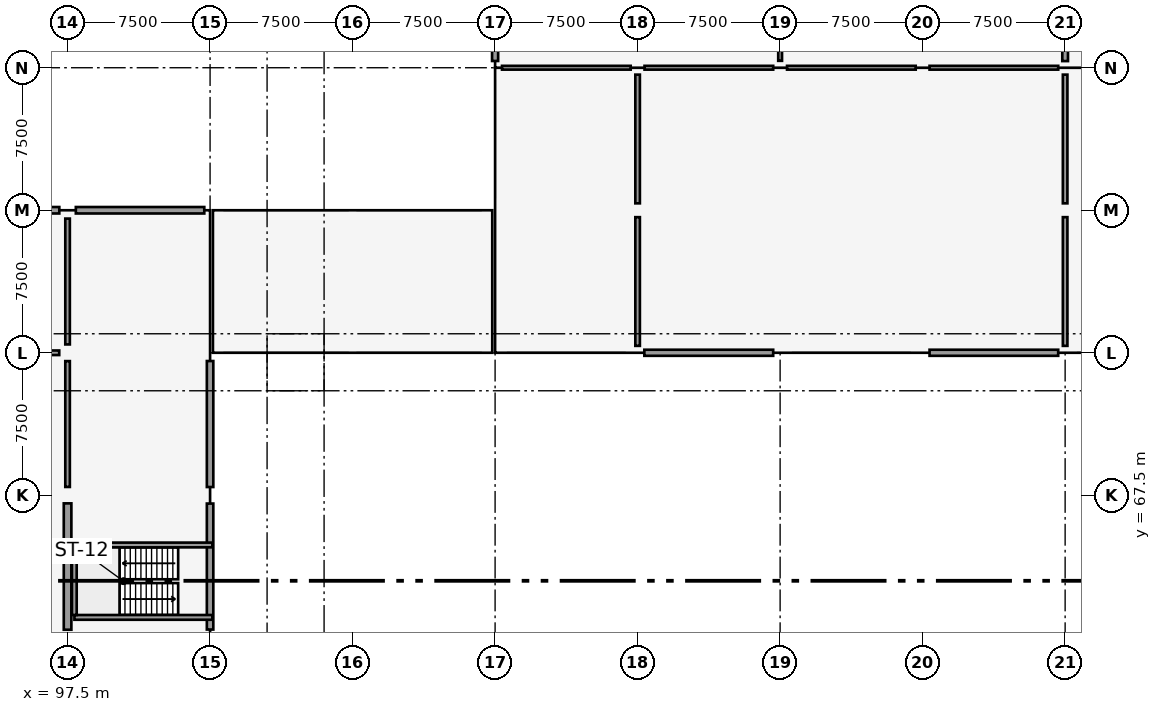
"""IFC4 building model, lengths in metres.
Left out: names, types, materials, properties, quantities, classifications, styles, units other than length and angle.
Written with IfcOpenShell. Run it as: python <this file> out.ifc"""

import sys

from ifc_helpers import new_model, si_unit, direction, frame, frame_2d, origin, origin_2d, place, context, subcontext, project, spatial, rectangle, extrude, element, fill, save


model = new_model("IFC4")
c1 = context("Model", 3, precision=1e-05, world=origin(), true_north=direction((0.0, 1.0)))
c2 = subcontext(c1, "Body", "Model", "MODEL_VIEW")
j1 = project(units=[si_unit("LENGTHUNIT", "METRE"), si_unit("PLANEANGLEUNIT", "RADIAN")], contexts=[c1])
p1 = place(None, origin())
s1 = spatial("IfcSite", under=j1, at=p1, CompositionType="ELEMENT")
p2 = place(p1, origin())
s2 = spatial("IfcBuilding", under=s1, at=p2, CompositionType="ELEMENT")
p3 = place(p2, frame((0.0, 0.0, 4.8)))
s3 = spatial("IfcBuildingStorey", under=s2, at=p3, CompositionType="ELEMENT", Elevation=4.8)
for number, where, z_axis, x_axis in (
    (1, (97.5, 60.0, 0.0), (0.0, 0.0, 1.0), (1.0, 0.0, 0.0)),
    (2, (97.5, 67.5, 0.0), (0.0, 0.0, 1.0), (1.0, 0.0, 0.0)),
    (3, (97.5, 75.0, 0.0), (0.0, 0.0, 1.0), (1.0, 0.0, 0.0)),
    (4, (97.5, 82.5, 0.0), (0.0, 0.0, 1.0), (1.0, 0.0, 0.0)),
    (5, (105.0, 60.0, 0.0), (0.0, 0.0, 1.0), (1.0, 0.0, 0.0)),
    (6, (105.0, 67.5, 0.0), (0.0, 0.0, 1.0), (1.0, 0.0, 0.0)),
    (7, (105.0, 75.0, 0.0), (0.0, 0.0, 1.0), (1.0, 0.0, 0.0)),
):
    element("IfcColumn", number, at=place(p3, frame(where, z_axis=z_axis, x_axis=x_axis)), inside=s3, PredefinedType="COLUMN", context=c2, shape_type="SweptSolid", body=[
        extrude(rectangle(XDim=0.85, YDim=0.85, at=origin_2d()), origin(), (0.0, 0.0, 1.0), 4.2),
    ])
p4 = place(p3, frame((105.0, 82.5, 0.0), z_axis=(0.0, 0.0, 1.0), x_axis=(1.0, 0.0, 0.0)))
e8 = element("IfcColumn", 8, at=p4, inside=s3, PredefinedType="COLUMN", context=c2, shape_type="SweptSolid", body=[
    extrude(rectangle(XDim=0.6, YDim=1.1, at=origin_2d()), origin(), (0.0, 0.0, 1.0), 4.2),
])
for number, where, z_axis, x_axis in (
    (9, (120.0, 75.0, 0.0), (0.0, 0.0, 1.0), (1.0, 0.0, 0.0)),
    (10, (120.0, 82.5, 0.0), (0.0, 0.0, 1.0), (1.0, 0.0, 0.0)),
    (11, (120.0, 90.0, 0.0), (0.0, 0.0, 1.0), (1.0, 0.0, 0.0)),
    (12, (127.5, 75.0, 0.0), (0.0, 0.0, 1.0), (1.0, 0.0, 0.0)),
    (13, (127.5, 82.5, 0.0), (0.0, 0.0, 1.0), (1.0, 0.0, 0.0)),
    (14, (127.5, 90.0, 0.0), (0.0, 0.0, 1.0), (1.0, 0.0, 0.0)),
    (15, (135.0, 75.0, 0.0), (0.0, 0.0, 1.0), (1.0, 0.0, 0.0)),
    (16, (135.0, 90.0, 0.0), (0.0, 0.0, 1.0), (1.0, 0.0, 0.0)),
    (17, (142.5, 75.0, 0.0), (0.0, 0.0, 1.0), (1.0, 0.0, 0.0)),
    (18, (142.5, 90.0, 0.0), (0.0, 0.0, 1.0), (1.0, 0.0, 0.0)),
    (19, (150.0, 75.0, 0.0), (0.0, 0.0, 1.0), (1.0, 0.0, 0.0)),
    (20, (150.0, 82.5, 0.0), (0.0, 0.0, 1.0), (1.0, 0.0, 0.0)),
    (21, (150.0, 90.0, 0.0), (0.0, 0.0, 1.0), (1.0, 0.0, 0.0)),
):
    element("IfcColumn", number, at=place(p3, frame(where, z_axis=z_axis, x_axis=x_axis)), inside=s3, PredefinedType="COLUMN", context=c2, shape_type="SweptSolid", body=[
        extrude(rectangle(XDim=0.7, YDim=0.7, at=origin_2d()), origin(), (0.0, 0.0, 1.0), 4.2),
    ])
p5 = place(p3, frame((105.0, 71.25, 0.0), z_axis=(0.0, 0.0, 1.0), x_axis=(1.0, 0.0, 0.0)))
e22 = element("IfcColumn", 22, at=p5, inside=s3, PredefinedType="PILASTER", context=c2, shape_type="SweptSolid", body=[
    extrude(rectangle(XDim=0.45, YDim=0.85, at=origin_2d()), origin(), (0.0, 0.0, 1.0), 4.2),
])
p6 = place(p3, frame((97.5, 60.425, 0.0), z_axis=(0.0, 0.0, 1.0), x_axis=(0.0, 1.0, 0.0)))
e23 = element("IfcWall", 23, at=p6, inside=s3, PredefinedType="SHEAR", context=c2, shape_type="SweptSolid", body=[
    extrude(rectangle(XDim=6.65, YDim=0.4, at=frame_2d((3.325, 0.0))), origin(), (0.0, 0.0, 1.0), 2.87),
])
p7 = place(p3, frame((150.0, 90.35, 0.0), z_axis=(0.0, 0.0, 1.0), x_axis=(0.0, 1.0, 0.0)))
e24 = element("IfcWall", 24, at=p7, inside=s3, PredefinedType="SHEAR", context=c2, shape_type="SweptSolid", body=[
    extrude(rectangle(XDim=6.8, YDim=0.3, at=frame_2d((3.4, 0.0))), origin(), (0.0, 0.0, 1.0), 3.9),
])
for number, where, z_axis, x_axis in (
    (25, (105.0, 60.435, 0.0), (0.0, 0.0, 1.0), (0.0, 1.0, 0.0)),
    (26, (105.0, 67.935, 0.0), (0.0, 0.0, 1.0), (0.0, 1.0, 0.0)),
):
    element("IfcWall", number, at=place(p3, frame(where, z_axis=z_axis, x_axis=x_axis)), inside=s3, PredefinedType="SOLIDWALL", context=c2, shape_type="SweptSolid", body=[
        extrude(rectangle(XDim=6.63, YDim=0.34, at=frame_2d((3.315, 0.0))), origin(), (0.0, 0.0, 1.0), 2.84),
    ])
p8 = place(p3, frame((90.435, 82.5, 0.0), z_axis=(0.0, 0.0, 1.0), x_axis=(1.0, 0.0, 0.0)))
e27 = element("IfcWall", 27, at=p8, inside=s3, PredefinedType="SOLIDWALL", context=c2, shape_type="SweptSolid", body=[
    extrude(rectangle(XDim=6.63, YDim=0.34, at=frame_2d((3.315, 0.0))), origin(), (0.0, 0.0, 1.0), 3.14),
])
p9 = place(p8, frame((2.665, 0.0, 0.6)))
e28 = element("IfcOpeningElement", 28, at=p9, cuts=e27, PredefinedType="OPENING", context=c2, shape_type="SweptSolid", body=[
    extrude(rectangle(XDim=1.3, YDim=1.3, at=frame_2d((0.65, 0.65))), frame((0.0, 0.18, 0.0), z_axis=(0.0, -1.0, 0.0), x_axis=(1.0, 0.0, 0.0)), (0.0, 0.0, 1.0), 0.36),
])
p10 = place(p3, frame((97.935, 82.5, 0.0), z_axis=(0.0, 0.0, 1.0), x_axis=(1.0, 0.0, 0.0)))
e29 = element("IfcWall", 29, at=p10, inside=s3, PredefinedType="SOLIDWALL", context=c2, shape_type="SweptSolid", body=[
    extrude(rectangle(XDim=6.76, YDim=0.34, at=frame_2d((3.38, 0.0))), origin(), (0.0, 0.0, 1.0), 3.14),
])
p11 = place(p10, frame((2.59, 0.0, 0.6)))
e30 = element("IfcOpeningElement", 30, at=p11, cuts=e29, PredefinedType="OPENING", context=c2, shape_type="SweptSolid", body=[
    extrude(rectangle(XDim=1.45, YDim=1.3, at=frame_2d((0.725, 0.65))), frame((0.0, 0.18, 0.0), z_axis=(0.0, -1.0, 0.0), x_axis=(1.0, 0.0, 0.0)), (0.0, 0.0, 1.0), 0.36),
])
p12 = place(p3, frame((127.855, 75.0, 0.0), z_axis=(0.0, 0.0, 1.0), x_axis=(1.0, 0.0, 0.0)))
e31 = element("IfcWall", 31, at=p12, inside=s3, PredefinedType="SOLIDWALL", context=c2, shape_type="SweptSolid", body=[
    extrude(rectangle(XDim=6.78, YDim=0.32, at=frame_2d((3.39, 0.0))), origin(), (0.0, 0.0, 1.0), 2.89),
])
p13 = place(p12, frame((2.545, 0.0, 0.6)))
e32 = element("IfcOpeningElement", 32, at=p13, cuts=e31, PredefinedType="OPENING", context=c2, shape_type="SweptSolid", body=[
    extrude(rectangle(XDim=1.7, YDim=1.8, at=frame_2d((0.85, 0.9))), frame((0.0, 0.17, 0.0), z_axis=(0.0, -1.0, 0.0), x_axis=(1.0, 0.0, 0.0)), (0.0, 0.0, 1.0), 0.34),
])
p14 = place(p3, frame((142.865, 75.0, 0.0), z_axis=(0.0, 0.0, 1.0), x_axis=(1.0, 0.0, 0.0)))
e33 = element("IfcWall", 33, at=p14, inside=s3, PredefinedType="SOLIDWALL", context=c2, shape_type="SweptSolid", body=[
    extrude(rectangle(XDim=6.77, YDim=0.32, at=frame_2d((3.385, 0.0))), origin(), (0.0, 0.0, 1.0), 2.89),
])
p15 = place(p14, frame((2.385, 0.0, 0.6)))
e34 = element("IfcOpeningElement", 34, at=p15, cuts=e33, PredefinedType="OPENING", context=c2, shape_type="SweptSolid", body=[
    extrude(rectangle(XDim=2.0, YDim=1.45, at=frame_2d((1.0, 0.725))), frame((0.0, 0.17, 0.0), z_axis=(0.0, -1.0, 0.0), x_axis=(1.0, 0.0, 0.0)), (0.0, 0.0, 1.0), 0.34),
])
p16 = place(p3, frame((120.0, 90.355, 0.0), z_axis=(0.0, 0.0, 1.0), x_axis=(0.0, 1.0, 0.0)))
e35 = element("IfcWall", 35, at=p16, inside=s3, PredefinedType="SOLIDWALL", context=c2, shape_type="SweptSolid", body=[
    extrude(rectangle(XDim=6.79, YDim=0.32, at=frame_2d((3.395, 0.0))), origin(), (0.0, 0.0, 1.0), 2.99),
])
p17 = place(p16, frame((2.62, 0.0, 0.6)))
e36 = element("IfcOpeningElement", 36, at=p17, cuts=e35, PredefinedType="OPENING", context=c2, shape_type="SweptSolid", body=[
    extrude(rectangle(XDim=1.55, YDim=1.8, at=frame_2d((0.775, 0.9))), frame((0.0, 0.17, 0.0), z_axis=(0.0, -1.0, 0.0), x_axis=(1.0, 0.0, 0.0)), (0.0, 0.0, 1.0), 0.34),
])
p18 = place(p3, frame((97.86, 61.075, 0.0), z_axis=(0.0, 0.0, 1.0), x_axis=(1.0, 0.0, 0.0)))
e37 = element("IfcWall", 37, at=p18, inside=s3, PredefinedType="SOLIDWALL", context=c2, shape_type="SweptSolid", body=[
    extrude(rectangle(XDim=7.26, YDim=0.25, at=frame_2d((3.63, 0.0))), origin(), (0.0, 0.0, 1.0), 3.92),
])
p19 = place(p18, frame((5.54, 0.0, 0.0)))
e38 = element("IfcOpeningElement", 38, at=p19, cuts=e37, PredefinedType="OPENING", context=c2, shape_type="SweptSolid", body=[
    extrude(rectangle(XDim=1.1, YDim=2.15, at=frame_2d((0.55, 1.075))), frame((0.0, 0.135, 0.0), z_axis=(0.0, -1.0, 0.0), x_axis=(1.0, 0.0, 0.0)), (0.0, 0.0, 1.0), 0.27),
])
p20 = place(p3, frame((97.86, 64.885, 0.0), z_axis=(0.0, 0.0, 1.0), x_axis=(1.0, 0.0, 0.0)))
e39 = element("IfcWall", 39, at=p20, inside=s3, PredefinedType="SOLIDWALL", context=c2, shape_type="SweptSolid", body=[
    extrude(rectangle(XDim=7.26, YDim=0.25, at=frame_2d((3.63, 0.0))), origin(), (0.0, 0.0, 1.0), 3.92),
])
p21 = place(p20, frame((5.54, 0.0, 0.0)))
e40 = element("IfcOpeningElement", 40, at=p21, cuts=e39, PredefinedType="OPENING", context=c2, shape_type="SweptSolid", body=[
    extrude(rectangle(XDim=1.1, YDim=2.15, at=frame_2d((0.55, 1.075))), frame((0.0, 0.135, 0.0), z_axis=(0.0, -1.0, 0.0), x_axis=(1.0, 0.0, 0.0)), (0.0, 0.0, 1.0), 0.27),
])
p22 = place(p3, frame((97.855, 61.2, 0.0), z_axis=(0.0, 0.0, 1.0), x_axis=(0.0, 1.0, 0.0)))
e41 = element("IfcWall", 41, at=p22, inside=s3, PredefinedType="SOLIDWALL", context=c2, shape_type="SweptSolid", body=[
    extrude(rectangle(XDim=3.56, YDim=0.25, at=frame_2d((1.78, 0.0))), origin(), (0.0, 0.0, 1.0), 3.92),
])
p23 = place(p3, frame((90.439, 75.0, 0.0), z_axis=(0.0, 0.0, 1.0), x_axis=(1.0, 0.0, 0.0)))
e42 = element("IfcWall", 42, at=p23, inside=s3, PredefinedType="PARTITIONING", context=c2, shape_type="SweptSolid", body=[
    extrude(rectangle(XDim=6.622, YDim=0.24, at=frame_2d((3.311, 0.0))), origin(), (0.0, 0.0, 1.0), 2.84),
])
p24 = place(p23, frame((2.961, 0.0, 0.0)))
e43 = element("IfcOpeningElement", 43, at=p24, cuts=e42, PredefinedType="OPENING", context=c2, shape_type="SweptSolid", body=[
    extrude(rectangle(XDim=2.2, YDim=2.18, at=frame_2d((1.1, 1.09))), frame((0.0, 0.13, 0.0), z_axis=(0.0, -1.0, 0.0), x_axis=(1.0, 0.0, 0.0)), (0.0, 0.0, 1.0), 0.26),
])
p25 = place(p3, frame((97.5, 67.939, 0.0), z_axis=(0.0, 0.0, 1.0), x_axis=(0.0, 1.0, 0.0)))
e44 = element("IfcWall", 44, at=p25, inside=s3, PredefinedType="PARTITIONING", context=c2, shape_type="SweptSolid", body=[
    extrude(rectangle(XDim=6.622, YDim=0.24, at=frame_2d((3.311, 0.0))), origin(), (0.0, 0.0, 1.0), 2.84),
])
p26 = place(p25, frame((2.411, 0.0, 0.0)))
e45 = element("IfcOpeningElement", 45, at=p26, cuts=e44, PredefinedType="OPENING", context=c2, shape_type="SweptSolid", body=[
    extrude(rectangle(XDim=1.8, YDim=2.16, at=frame_2d((0.9, 1.08))), frame((0.0, 0.13, 0.0), z_axis=(0.0, -1.0, 0.0), x_axis=(1.0, 0.0, 0.0)), (0.0, 0.0, 1.0), 0.26),
])
p27 = place(p3, frame((97.5, 75.439, 0.0), z_axis=(0.0, 0.0, 1.0), x_axis=(0.0, 1.0, 0.0)))
e46 = element("IfcWall", 46, at=p27, inside=s3, PredefinedType="PARTITIONING", context=c2, shape_type="SweptSolid", body=[
    extrude(rectangle(XDim=6.622, YDim=0.24, at=frame_2d((3.311, 0.0))), origin(), (0.0, 0.0, 1.0), 2.94),
])
p28 = place(p27, frame((2.511, 0.0, 0.0)))
e47 = element("IfcOpeningElement", 47, at=p28, cuts=e46, PredefinedType="OPENING", context=c2, shape_type="SweptSolid", body=[
    extrude(rectangle(XDim=1.6, YDim=2.15, at=frame_2d((0.8, 1.075))), frame((0.0, 0.13, 0.0), z_axis=(0.0, -1.0, 0.0), x_axis=(1.0, 0.0, 0.0)), (0.0, 0.0, 1.0), 0.26),
])
p29 = place(p3, frame((120.364, 90.0, 0.0), z_axis=(0.0, 0.0, 1.0), x_axis=(1.0, 0.0, 0.0)))
e48 = element("IfcWall", 48, at=p29, inside=s3, PredefinedType="PARTITIONING", context=c2, shape_type="SweptSolid", body=[
    extrude(rectangle(XDim=6.772, YDim=0.2, at=frame_2d((3.386, 0.0))), origin(), (0.0, 0.0, 1.0), 2.94),
])
p30 = place(p29, frame((2.586, 0.0, 0.0)))
e49 = element("IfcOpeningElement", 49, at=p30, cuts=e48, PredefinedType="OPENING", context=c2, shape_type="SweptSolid", body=[
    extrude(rectangle(XDim=1.6, YDim=2.16, at=frame_2d((0.8, 1.08))), frame((0.0, 0.11, 0.0), z_axis=(0.0, -1.0, 0.0), x_axis=(1.0, 0.0, 0.0)), (0.0, 0.0, 1.0), 0.22),
])
for number, where, z_axis, x_axis in (
    (50, (127.864, 90.0, 0.0), (0.0, 0.0, 1.0), (1.0, 0.0, 0.0)),
    (51, (135.364, 90.0, 0.0), (0.0, 0.0, 1.0), (1.0, 0.0, 0.0)),
):
    element("IfcWall", number, at=place(p3, frame(where, z_axis=z_axis, x_axis=x_axis)), inside=s3, PredefinedType="PARTITIONING", context=c2, shape_type="SweptSolid", body=[
        extrude(rectangle(XDim=6.772, YDim=0.2, at=frame_2d((3.386, 0.0))), origin(), (0.0, 0.0, 1.0), 2.89),
    ])
p31 = place(p3, frame((142.864, 90.0, 0.0), z_axis=(0.0, 0.0, 1.0), x_axis=(1.0, 0.0, 0.0)))
e52 = element("IfcWall", 52, at=p31, inside=s3, PredefinedType="PARTITIONING", context=c2, shape_type="SweptSolid", body=[
    extrude(rectangle(XDim=6.772, YDim=0.2, at=frame_2d((3.386, 0.0))), origin(), (0.0, 0.0, 1.0), 2.84),
])
p32 = place(p3, frame((127.5, 75.364, 0.0), z_axis=(0.0, 0.0, 1.0), x_axis=(0.0, 1.0, 0.0)))
e53 = element("IfcWall", 53, at=p32, inside=s3, PredefinedType="PARTITIONING", context=c2, shape_type="SweptSolid", body=[
    extrude(rectangle(XDim=6.772, YDim=0.24, at=frame_2d((3.386, 0.0))), origin(), (0.0, 0.0, 1.0), 3.04),
])
p33 = place(p32, frame((2.586, 0.0, 0.0)))
e54 = element("IfcOpeningElement", 54, at=p33, cuts=e53, PredefinedType="OPENING", context=c2, shape_type="SweptSolid", body=[
    extrude(rectangle(XDim=1.6, YDim=2.16, at=frame_2d((0.8, 1.08))), frame((0.0, 0.13, 0.0), z_axis=(0.0, -1.0, 0.0), x_axis=(1.0, 0.0, 0.0)), (0.0, 0.0, 1.0), 0.26),
])
p34 = place(p3, frame((127.5, 82.864, 0.0), z_axis=(0.0, 0.0, 1.0), x_axis=(0.0, 1.0, 0.0)))
e55 = element("IfcWall", 55, at=p34, inside=s3, PredefinedType="PARTITIONING", context=c2, shape_type="SweptSolid", body=[
    extrude(rectangle(XDim=6.772, YDim=0.24, at=frame_2d((3.386, 0.0))), origin(), (0.0, 0.0, 1.0), 2.94),
])
p35 = place(p3, frame((135.0, 90.364, 0.0), z_axis=(0.0, 0.0, 1.0), x_axis=(0.0, 1.0, 0.0)))
e56 = element("IfcWall", 56, at=p35, inside=s3, PredefinedType="PARTITIONING", context=c2, shape_type="SweptSolid", body=[
    extrude(rectangle(XDim=6.772, YDim=0.2, at=frame_2d((3.386, 0.0))), origin(), (0.0, 0.0, 1.0), 2.84),
])
p36 = place(p3, frame((150.0, 75.364, 0.0), z_axis=(0.0, 0.0, 1.0), x_axis=(0.0, 1.0, 0.0)))
e57 = element("IfcWall", 57, at=p36, inside=s3, PredefinedType="PARTITIONING", context=c2, shape_type="SweptSolid", body=[
    extrude(rectangle(XDim=6.772, YDim=0.24, at=frame_2d((3.386, 0.0))), origin(), (0.0, 0.0, 1.0), 2.94),
])
p37 = place(p36, frame((2.586, 0.0, 0.0)))
e58 = element("IfcOpeningElement", 58, at=p37, cuts=e57, PredefinedType="OPENING", context=c2, shape_type="SweptSolid", body=[
    extrude(rectangle(XDim=1.6, YDim=2.16, at=frame_2d((0.8, 1.08))), frame((0.0, 0.13, 0.0), z_axis=(0.0, -1.0, 0.0), x_axis=(1.0, 0.0, 0.0)), (0.0, 0.0, 1.0), 0.26),
])
p38 = place(p3, frame((150.0, 82.864, 0.0), z_axis=(0.0, 0.0, 1.0), x_axis=(0.0, 1.0, 0.0)))
e59 = element("IfcWall", 59, at=p38, inside=s3, PredefinedType="PARTITIONING", context=c2, shape_type="SweptSolid", body=[
    extrude(rectangle(XDim=6.772, YDim=0.24, at=frame_2d((3.386, 0.0))), origin(), (0.0, 0.0, 1.0), 2.84),
])
p39 = place(p11, origin())
e60 = element("IfcWindow", 60, at=p39, inside=s3, PartitioningType="SINGLE_PANEL", PredefinedType="WINDOW", context=c2, shape_type="SweptSolid", body=[
    extrude(rectangle(XDim=1.45, YDim=1.3, at=frame_2d((0.725, 0.65))), frame((0.0, 0.03, 0.0), z_axis=(0.0, -1.0, 0.0), x_axis=(1.0, 0.0, 0.0)), (0.0, 0.0, 1.0), 0.06),
])
fill(e30, e60)
p40 = place(p13, origin())
e61 = element("IfcWindow", 61, at=p40, inside=s3, PartitioningType="SINGLE_PANEL", PredefinedType="WINDOW", context=c2, shape_type="SweptSolid", body=[
    extrude(rectangle(XDim=1.7, YDim=1.8, at=frame_2d((0.85, 0.9))), frame((0.0, 0.03, 0.0), z_axis=(0.0, -1.0, 0.0), x_axis=(1.0, 0.0, 0.0)), (0.0, 0.0, 1.0), 0.06),
])
fill(e32, e61)
p41 = place(p15, origin())
e62 = element("IfcWindow", 62, at=p41, inside=s3, PartitioningType="SINGLE_PANEL", PredefinedType="WINDOW", context=c2, shape_type="SweptSolid", body=[
    extrude(rectangle(XDim=2.0, YDim=1.45, at=frame_2d((1.0, 0.725))), frame((0.0, 0.03, 0.0), z_axis=(0.0, -1.0, 0.0), x_axis=(1.0, 0.0, 0.0)), (0.0, 0.0, 1.0), 0.06),
])
fill(e34, e62)
p42 = place(p19, origin())
e63 = element("IfcDoor", 63, at=p42, inside=s3, OperationType="SINGLE_SWING_LEFT", PredefinedType="DOOR", context=c2, shape_type="SweptSolid", body=[
    extrude(rectangle(XDim=1.1, YDim=2.15, at=frame_2d((0.55, 1.075))), frame((0.0, 0.025, 0.0), z_axis=(0.0, -1.0, 0.0), x_axis=(1.0, 0.0, 0.0)), (0.0, 0.0, 1.0), 0.05),
])
fill(e38, e63)
p43 = place(p21, frame((1.1, 0.0, 0.0), z_axis=(0.0, 0.0, 1.0), x_axis=(-1.0, 0.0, 0.0)))
e64 = element("IfcDoor", 64, at=p43, inside=s3, OperationType="SINGLE_SWING_RIGHT", PredefinedType="DOOR", context=c2, shape_type="SweptSolid", body=[
    extrude(rectangle(XDim=1.1, YDim=2.15, at=frame_2d((0.55, 1.075))), frame((0.0, 0.025, 0.0), z_axis=(0.0, -1.0, 0.0), x_axis=(1.0, 0.0, 0.0)), (0.0, 0.0, 1.0), 0.05),
])
fill(e40, e64)
p44 = place(p26, origin())
e65 = element("IfcDoor", 65, at=p44, inside=s3, OperationType="SINGLE_SWING_RIGHT", PredefinedType="DOOR", context=c2, shape_type="SweptSolid", body=[
    extrude(rectangle(XDim=1.8, YDim=2.16, at=frame_2d((0.9, 1.08))), frame((0.0, 0.025, 0.0), z_axis=(0.0, -1.0, 0.0), x_axis=(1.0, 0.0, 0.0)), (0.0, 0.0, 1.0), 0.05),
])
fill(e45, e65)
p45 = place(p28, origin())
e66 = element("IfcDoor", 66, at=p45, inside=s3, OperationType="SINGLE_SWING_LEFT", PredefinedType="DOOR", context=c2, shape_type="SweptSolid", body=[
    extrude(rectangle(XDim=1.6, YDim=2.15, at=frame_2d((0.8, 1.075))), frame((0.0, 0.025, 0.0), z_axis=(0.0, -1.0, 0.0), x_axis=(1.0, 0.0, 0.0)), (0.0, 0.0, 1.0), 0.05),
])
fill(e47, e66)
p46 = place(p30, origin())
e67 = element("IfcDoor", 67, at=p46, inside=s3, OperationType="SINGLE_SWING_RIGHT", PredefinedType="DOOR", context=c2, shape_type="SweptSolid", body=[
    extrude(rectangle(XDim=1.6, YDim=2.16, at=frame_2d((0.8, 1.08))), frame((0.0, 0.025, 0.0), z_axis=(0.0, -1.0, 0.0), x_axis=(1.0, 0.0, 0.0)), (0.0, 0.0, 1.0), 0.05),
])
fill(e49, e67)
p47 = place(p33, origin())
e68 = element("IfcDoor", 68, at=p47, inside=s3, OperationType="SINGLE_SWING_LEFT", PredefinedType="DOOR", context=c2, shape_type="SweptSolid", body=[
    extrude(rectangle(XDim=1.6, YDim=2.16, at=frame_2d((0.8, 1.08))), frame((0.0, 0.025, 0.0), z_axis=(0.0, -1.0, 0.0), x_axis=(1.0, 0.0, 0.0)), (0.0, 0.0, 1.0), 0.05),
])
fill(e54, e68)
p48 = place(p37, origin())
e69 = element("IfcDoor", 69, at=p48, inside=s3, OperationType="SINGLE_SWING_LEFT", PredefinedType="DOOR", context=c2, shape_type="SweptSolid", body=[
    extrude(rectangle(XDim=1.6, YDim=2.16, at=frame_2d((0.8, 1.08))), frame((0.0, 0.025, 0.0), z_axis=(0.0, -1.0, 0.0), x_axis=(1.0, 0.0, 0.0)), (0.0, 0.0, 1.0), 0.05),
])
fill(e58, e69)
save(model, sys.argv[1])
